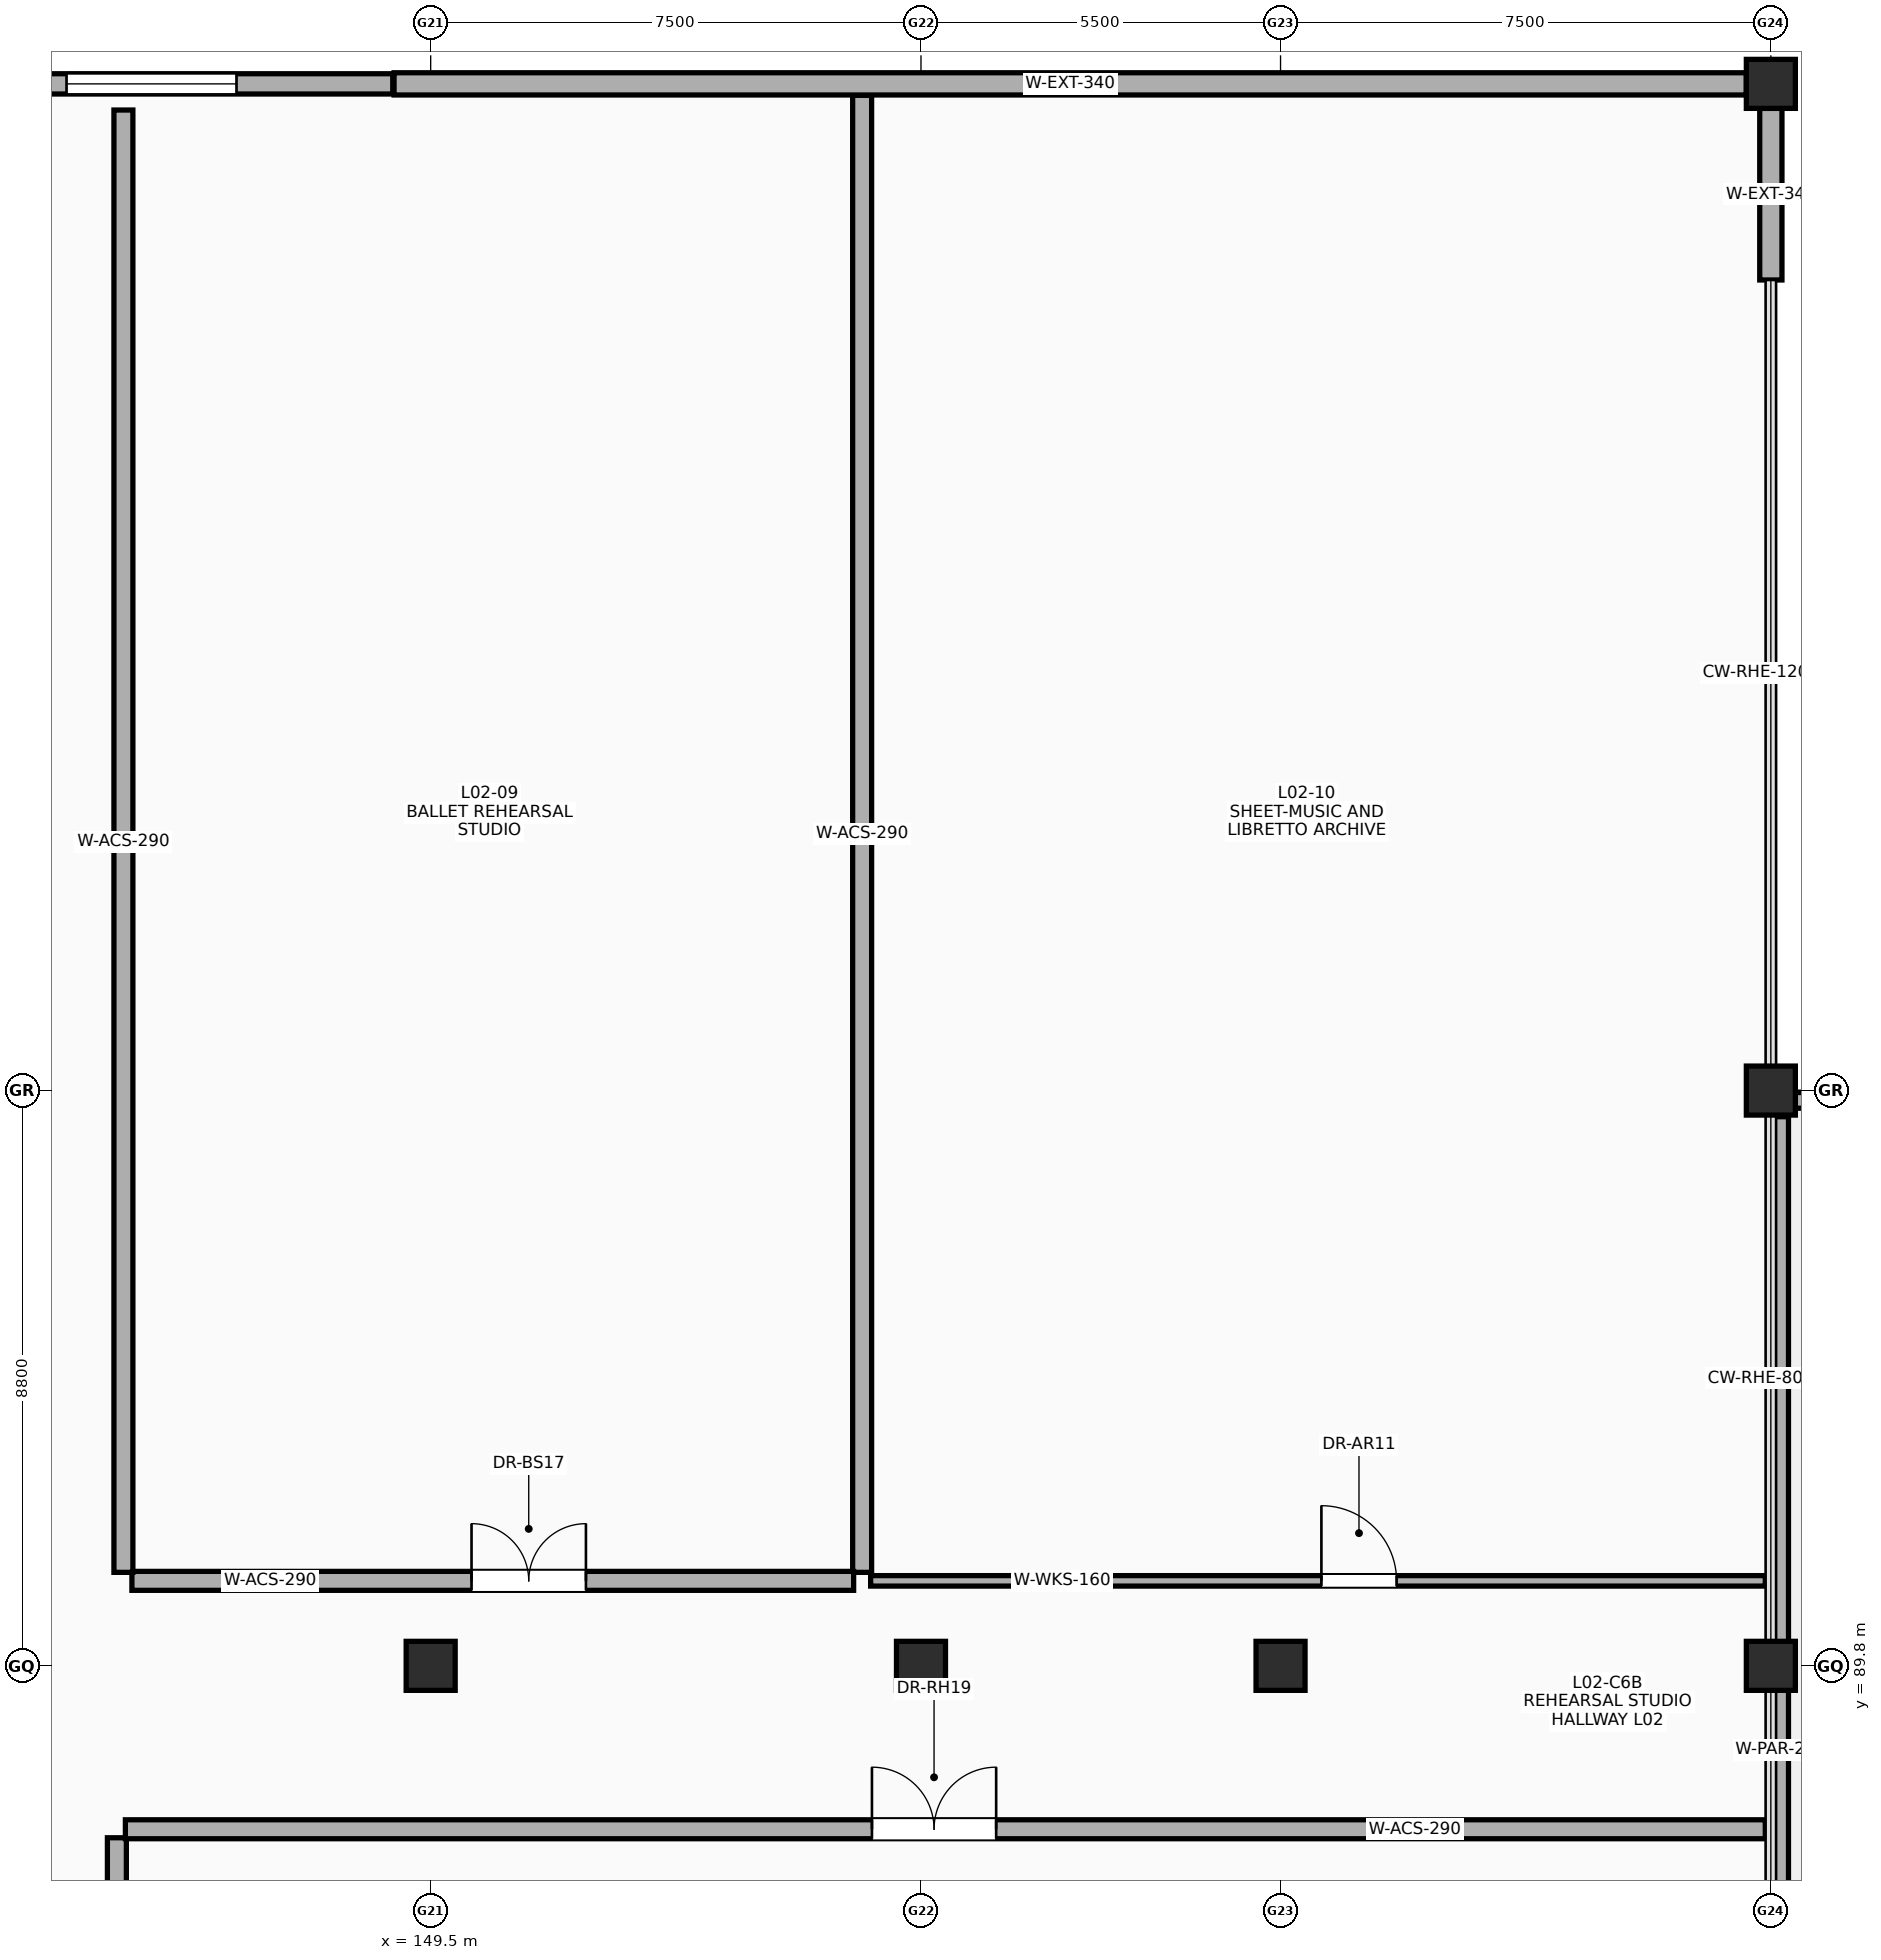
"""IFC4 building model, lengths in metres.
Left out: names, types, materials, properties, quantities, classifications, styles, units other than length and angle.
Written with IfcOpenShell. Run it as: python <this file> out.ifc"""

import sys

from ifc_helpers import new_model, si_unit, direction, frame, frame_2d, origin, origin_2d, place, context, subcontext, project, spatial, rectangle, extrude, element, fill, save


model = new_model("IFC4")
c1 = context("Model", 3, precision=1e-05, world=origin(), true_north=direction((0.0, 1.0)))
c2 = subcontext(c1, "Body", "Model", "MODEL_VIEW")
j1 = project(units=[si_unit("LENGTHUNIT", "METRE"), si_unit("PLANEANGLEUNIT", "RADIAN")], contexts=[c1])
p1 = place(None, origin())
s1 = spatial("IfcSite", under=j1, at=p1, CompositionType="ELEMENT")
p2 = place(p1, origin())
s2 = spatial("IfcBuilding", under=s1, at=p2, CompositionType="ELEMENT")
p3 = place(p2, frame((0.0, 0.0, 9.8)))
s3 = spatial("IfcBuildingStorey", under=s2, at=p3, CompositionType="ELEMENT", Elevation=9.8)
for number, where, z_axis, x_axis in (
    (1, (149.5, 89.8, 0.0), (0.0, 0.0, 1.0), (1.0, 0.0, 0.0)),
    (2, (157.0, 89.8, 0.0), (0.0, 0.0, 1.0), (1.0, 0.0, 0.0)),
    (3, (162.5, 89.8, 0.0), (0.0, 0.0, 1.0), (1.0, 0.0, 0.0)),
    (4, (170.0, 89.8, 0.0), (0.0, 0.0, 1.0), (1.0, 0.0, 0.0)),
    (5, (170.0, 98.6, 0.0), (0.0, 0.0, 1.0), (1.0, 0.0, 0.0)),
    (6, (170.0, 114.0, 0.0), (0.0, 0.0, 1.0), (1.0, 0.0, 0.0)),
):
    element("IfcColumn", number, at=place(p3, frame(where, z_axis=z_axis, x_axis=x_axis)), inside=s3, PredefinedType="COLUMN", context=c2, shape_type="SweptSolid", body=[
        extrude(rectangle(XDim=0.75, YDim=0.75, at=origin_2d()), origin(), (0.0, 0.0, 1.0), 4.4),
    ])
p4 = place(p3, frame((141.375, 114.0, 0.0), z_axis=(0.0, 0.0, 1.0), x_axis=(1.0, 0.0, 0.0)))
e7 = element("IfcWall", 7, at=p4, inside=s3, PredefinedType="SOLIDWALL", context=c2, shape_type="SweptSolid", body=[
    extrude(rectangle(XDim=7.545, YDim=0.31, at=frame_2d((3.772, 0.0))), origin(), (0.0, 0.0, 1.0), 2.86),
])
p5 = place(p4, frame((2.555, 0.0, 0.68)))
e8 = element("IfcOpeningElement", 8, at=p5, cuts=e7, PredefinedType="OPENING", context=c2, shape_type="SweptSolid", body=[
    extrude(rectangle(XDim=2.6, YDim=2.0, at=frame_2d((1.3, 1.0))), frame((0.0, 0.165, 0.0), z_axis=(0.0, -1.0, 0.0), x_axis=(1.0, 0.0, 0.0)), (0.0, 0.0, 1.0), 0.33),
])
p6 = place(p3, frame((170.0, 111.0, 0.0), z_axis=(0.0, 0.0, 1.0), x_axis=(0.0, 1.0, 0.0)))
e9 = element("IfcWall", 9, at=p6, inside=s3, PredefinedType="SOLIDWALL", context=c2, shape_type="SweptSolid", body=[
    extrude(rectangle(XDim=2.625, YDim=0.34, at=frame_2d((1.312, 0.0))), origin(), (0.0, 0.0, 1.0), 2.86),
])
p7 = place(p3, frame((170.15, 98.45, 0.0), z_axis=(0.0, 0.0, 1.0), x_axis=(1.0, 0.0, 0.0)))
e10 = element("IfcWall", 10, at=p7, inside=s3, PredefinedType="PARAPET", context=c2, shape_type="SweptSolid", body=[
    extrude(rectangle(XDim=5.7, YDim=0.24, at=frame_2d((2.85, 0.0))), origin(), (0.0, 0.0, 1.0), 0.65),
])
p8 = place(p3, frame((144.7, 81.8, 0.0), z_axis=(0.0, 0.0, 1.0), x_axis=(0.0, 1.0, 0.0)))
e11 = element("IfcWall", 11, at=p8, inside=s3, PredefinedType="PARTITIONING", context=c2, shape_type="SweptSolid", body=[
    extrude(rectangle(XDim=5.37, YDim=0.29, at=frame_2d((2.685, 0.0))), origin(), (0.0, 0.0, 1.0), 4.1),
])
p9 = place(p8, frame((1.75, 0.0, 0.0)))
e12 = element("IfcOpeningElement", 12, at=p9, cuts=e11, PredefinedType="OPENING", context=c2, shape_type="SweptSolid", body=[
    extrude(rectangle(XDim=1.9, YDim=2.35, at=frame_2d((0.95, 1.175))), frame((0.0, 0.155, 0.0), z_axis=(0.0, -1.0, 0.0), x_axis=(1.0, 0.0, 0.0)), (0.0, 0.0, 1.0), 0.31),
])
p10 = place(p3, frame((144.83, 87.3, 0.0), z_axis=(0.0, 0.0, 1.0), x_axis=(1.0, 0.0, 0.0)))
e13 = element("IfcWall", 13, at=p10, inside=s3, PredefinedType="PARTITIONING", context=c2, shape_type="SweptSolid", body=[
    extrude(rectangle(XDim=25.085, YDim=0.29, at=frame_2d((12.542, 0.0))), origin(), (0.0, 0.0, 1.0), 3.26),
])
p11 = place(p10, frame((11.42, 0.0, 0.0)))
e14 = element("IfcOpeningElement", 14, at=p11, cuts=e13, PredefinedType="OPENING", context=c2, shape_type="SweptSolid", body=[
    extrude(rectangle(XDim=1.9, YDim=2.35, at=frame_2d((0.95, 1.175))), frame((0.0, 0.155, 0.0), z_axis=(0.0, -1.0, 0.0), x_axis=(1.0, 0.0, 0.0)), (0.0, 0.0, 1.0), 0.31),
])
p12 = place(p3, frame((156.1, 91.23, 0.0), z_axis=(0.0, 0.0, 1.0), x_axis=(0.0, 1.0, 0.0)))
e15 = element("IfcWall", 15, at=p12, inside=s3, PredefinedType="PARTITIONING", context=c2, shape_type="SweptSolid", body=[
    extrude(rectangle(XDim=22.595, YDim=0.29, at=frame_2d((11.297, 0.0))), origin(), (0.0, 0.0, 1.0), 2.86),
])
p13 = place(p3, frame((144.93, 91.1, 0.0), z_axis=(0.0, 0.0, 1.0), x_axis=(1.0, 0.0, 0.0)))
e16 = element("IfcWall", 16, at=p13, inside=s3, PredefinedType="PARTITIONING", context=c2, shape_type="SweptSolid", body=[
    extrude(rectangle(XDim=11.04, YDim=0.29, at=frame_2d((5.52, 0.0))), origin(), (0.0, 0.0, 1.0), 4.1),
])
p14 = place(p13, frame((5.195, 0.0, 0.0)))
e17 = element("IfcOpeningElement", 17, at=p14, cuts=e16, PredefinedType="OPENING", context=c2, shape_type="SweptSolid", body=[
    extrude(rectangle(XDim=1.75, YDim=2.25, at=frame_2d((0.875, 1.125))), frame((0.0, 0.155, 0.0), z_axis=(0.0, -1.0, 0.0), x_axis=(1.0, 0.0, 0.0)), (0.0, 0.0, 1.0), 0.31),
])
p15 = place(p3, frame((156.23, 91.1, 0.0), z_axis=(0.0, 0.0, 1.0), x_axis=(1.0, 0.0, 0.0)))
e18 = element("IfcWall", 18, at=p15, inside=s3, PredefinedType="PARTITIONING", context=c2, shape_type="SweptSolid", body=[
    extrude(rectangle(XDim=13.685, YDim=0.16, at=frame_2d((6.843, 0.0))), origin(), (0.0, 0.0, 1.0), 3.26),
])
p16 = place(p15, frame((6.895, 0.0, 0.0)))
e19 = element("IfcOpeningElement", 19, at=p16, cuts=e18, PredefinedType="OPENING", context=c2, shape_type="SweptSolid", body=[
    extrude(rectangle(XDim=1.15, YDim=2.18, at=frame_2d((0.575, 1.09))), frame((0.0, 0.09, 0.0), z_axis=(0.0, -1.0, 0.0), x_axis=(1.0, 0.0, 0.0)), (0.0, 0.0, 1.0), 0.18),
])
p17 = place(p3, frame((144.8, 91.23, 0.0), z_axis=(0.0, 0.0, 1.0), x_axis=(0.0, 1.0, 0.0)))
e20 = element("IfcWall", 20, at=p17, inside=s3, PredefinedType="PARTITIONING", context=c2, shape_type="SweptSolid", body=[
    extrude(rectangle(XDim=22.37, YDim=0.29, at=frame_2d((11.185, 0.0))), origin(), (0.0, 0.0, 1.0), 2.86),
])
p18 = place(p3, frame((148.94, 114.0, 0.0), z_axis=(0.0, 0.0, 1.0), x_axis=(1.0, 0.0, 0.0)))
e21 = element("IfcWall", 21, at=p18, inside=s3, PredefinedType="SOLIDWALL", context=c2, shape_type="SweptSolid", body=[
    extrude(rectangle(XDim=20.685, YDim=0.34, at=frame_2d((10.343, 0.0))), origin(), (0.0, 0.0, 1.0), 2.86),
])
p19 = place(p3, frame((170.15, 30.845, 0.0), z_axis=(0.0, 0.0, 1.0), x_axis=(0.0, 1.0, 0.0)))
e22 = element("IfcWall", 22, at=p19, inside=s3, PredefinedType="PARAPET", context=c2, shape_type="SweptSolid", body=[
    extrude(rectangle(XDim=67.355, YDim=0.24, at=frame_2d((33.677, 0.0))), origin(), (0.0, 0.0, 1.0), 0.65),
])
p20 = place(p5, origin())
e23 = element("IfcWindow", 23, at=p20, inside=s3, PartitioningType="SINGLE_PANEL", PredefinedType="WINDOW", context=c2, shape_type="SweptSolid", body=[
    extrude(rectangle(XDim=2.6, YDim=2.0, at=frame_2d((1.3, 1.0))), frame((0.0, 0.03, 0.0), z_axis=(0.0, -1.0, 0.0), x_axis=(1.0, 0.0, 0.0)), (0.0, 0.0, 1.0), 0.06),
])
fill(e8, e23)
p21 = place(p11, origin())
e24 = element("IfcDoor", 24, at=p21, inside=s3, OperationType="DOUBLE_DOOR_SINGLE_SWING", PredefinedType="DOOR", context=c2, shape_type="SweptSolid", body=[
    extrude(rectangle(XDim=1.9, YDim=2.35, at=frame_2d((0.95, 1.175))), frame((0.0, 0.025, 0.0), z_axis=(0.0, -1.0, 0.0), x_axis=(1.0, 0.0, 0.0)), (0.0, 0.0, 1.0), 0.05),
])
fill(e14, e24)
p22 = place(p14, origin())
e25 = element("IfcDoor", 25, at=p22, inside=s3, OperationType="DOUBLE_DOOR_SINGLE_SWING", PredefinedType="DOOR", context=c2, shape_type="SweptSolid", body=[
    extrude(rectangle(XDim=1.75, YDim=2.25, at=frame_2d((0.875, 1.125))), frame((0.0, 0.025, 0.0), z_axis=(0.0, -1.0, 0.0), x_axis=(1.0, 0.0, 0.0)), (0.0, 0.0, 1.0), 0.05),
])
fill(e17, e25)
p23 = place(p16, origin())
e26 = element("IfcDoor", 26, at=p23, inside=s3, OperationType="SINGLE_SWING_LEFT", PredefinedType="DOOR", context=c2, shape_type="SweptSolid", body=[
    extrude(rectangle(XDim=1.15, YDim=2.18, at=frame_2d((0.575, 1.09))), frame((0.0, 0.025, 0.0), z_axis=(0.0, -1.0, 0.0), x_axis=(1.0, 0.0, 0.0)), (0.0, 0.0, 1.0), 0.05),
])
fill(e19, e26)
save(model, sys.argv[1])
